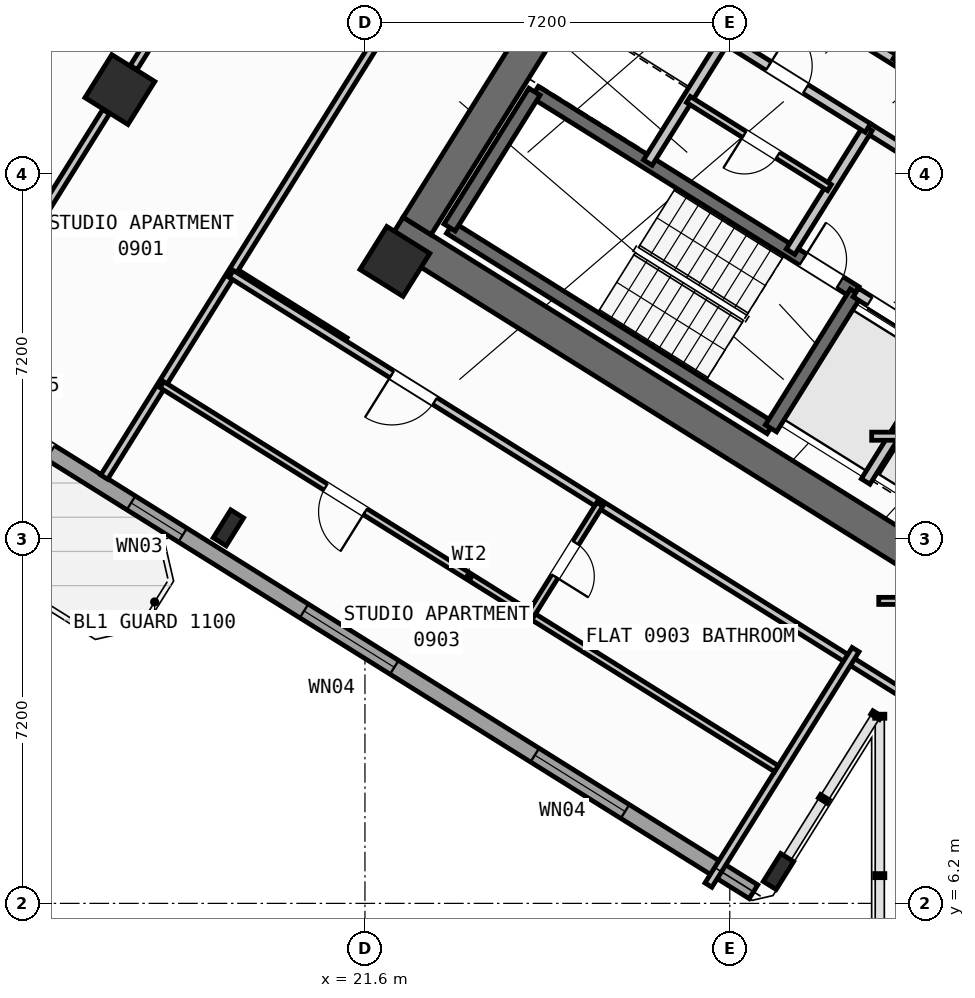
"""IFC4 building model, lengths in metres.
Left out: names, types, materials, properties, quantities, classifications, styles, units other than length and angle.
Written with IfcOpenShell. Run it as: python <this file> out.ifc"""

import sys

from ifc_helpers import new_model, si_unit, direction, frame, frame_2d, origin, origin_2d, place, context, subcontext, project, spatial, rectangle, hollow_rectangle, i_section, extrude, source, transform, mapped, element, fill, save


model = new_model("IFC4")
c1 = context("Model", 3, precision=1e-05, world=origin(), true_north=direction((0.0, 1.0)))
c2 = subcontext(c1, "Body", "Model", "MODEL_VIEW")
j1 = project(units=[si_unit("LENGTHUNIT", "METRE"), si_unit("PLANEANGLEUNIT", "RADIAN")], contexts=[c1])
p1 = place(None, origin())
s1 = spatial("IfcSite", under=j1, at=p1, CompositionType="ELEMENT")
p2 = place(p1, origin())
s2 = spatial("IfcBuilding", under=s1, at=p2, CompositionType="ELEMENT")
p3 = place(p2, frame((0.0, 0.0, 38.4)))
s3 = spatial("IfcBuildingStorey", under=s2, at=p3, CompositionType="ELEMENT", Elevation=38.4)
p4 = place(p3, frame((33.409, 12.45, 0.0), z_axis=(0.0, 0.0, 1.0), x_axis=(-0.848051132073, 0.529914405721, 0.0)))
e1 = element("IfcWall", 1, at=p4, inside=s3, PredefinedType="SHEAR", context=c2, shape_type="SweptSolid", body=[
    extrude(rectangle(XDim=13.24, YDim=0.65, at=frame_2d((6.62, 0.0))), origin(), (0.0, 0.0, 1.0), 3.35),
])
p5 = place(p3, frame((26.007, 24.976, 0.0), z_axis=(0.0, 0.0, 1.0), x_axis=(-0.529916319127, -0.848049936456, 0.0)))
e2 = element("IfcWall", 2, at=p5, inside=s3, PredefinedType="SHEAR", context=c2, shape_type="SweptSolid", body=[
    extrude(rectangle(XDim=6.375, YDim=0.65, at=frame_2d((3.188, 0.0))), origin(), (0.0, 0.0, 1.0), 3.35),
])
m1 = source(origin(), c2, "Body", "SweptSolid", [
    extrude(i_section(OverallWidth=0.3, OverallDepth=0.65, WebThickness=0.016, FlangeThickness=0.031, at=origin_2d()), origin(), (0.0, 0.0, 1.0), 3.6),
])
p6 = place(p3, frame((29.761, 6.829, 0.0), z_axis=(0.0, 0.0, 1.0), x_axis=(-0.848048096156, 0.529919264233, 0.0)))
e3 = element("IfcColumn", 3, at=p6, inside=s3, PredefinedType="COLUMN", context=c2, shape_type="MappedRepresentation", body=[
    mapped(m1, transform((0.0, 0.0, 0.0), scale=1.0)),
])
m2 = source(origin(), c2, "Body", "SweptSolid", [
    extrude(hollow_rectangle(XDim=1.0, YDim=1.0, WallThickness=0.04, at=origin_2d()), origin(), (0.0, 0.0, 1.0), 3.6),
])
p7 = place(p3, frame((22.191, 18.87, 0.0), z_axis=(0.0, 0.0, 1.0), x_axis=(-0.848048096156, 0.529919264233, 0.0)))
e4 = element("IfcColumn", 4, at=p7, inside=s3, PredefinedType="COLUMN", context=c2, shape_type="MappedRepresentation", body=[
    mapped(m2, transform((0.0, 0.0, 0.0), scale=1.0)),
])
p8 = place(p3, frame((18.906, 13.612, 0.0), z_axis=(0.0, 0.0, 1.0), x_axis=(-0.848048096156, 0.529919264233, 0.0)))
e5 = element("IfcColumn", 5, at=p8, inside=s3, PredefinedType="COLUMN", context=c2, shape_type="MappedRepresentation", body=[
    mapped(m1, transform((0.0, 0.0, 0.0), scale=1.0)),
])
p9 = place(p3, frame((16.764, 22.261, 0.0), z_axis=(0.0, 0.0, 1.0), x_axis=(-0.848048096156, 0.529919264233, 0.0)))
e6 = element("IfcColumn", 6, at=p9, inside=s3, PredefinedType="COLUMN", context=c2, shape_type="MappedRepresentation", body=[
    mapped(m2, transform((0.0, 0.0, 0.0), scale=1.0)),
])
p10 = place(p3, frame((29.268, 6.429, 0.0), z_axis=(0.0, 0.0, 1.0), x_axis=(-0.848049971435, 0.529916263149, 0.0)))
e7 = element("IfcWall", 7, at=p10, inside=s3, PredefinedType="STANDARD", context=c2, shape_type="SweptSolid", body=[
    extrude(rectangle(XDim=31.588, YDim=0.32, at=frame_2d((15.794, 0.0))), origin(), (0.0, 0.0, 1.0), 3.35),
])
p11 = place(p10, frame((16.362, 0.0, 0.0)))
e8 = element("IfcOpeningElement", 8, at=p11, cuts=e7, PredefinedType="OPENING", context=c2, shape_type="SweptSolid", body=[
    extrude(rectangle(XDim=1.2, YDim=2.15, at=frame_2d((0.6, 1.075))), frame((0.0, 0.17, 0.0), z_axis=(0.0, -1.0, 0.0), x_axis=(1.0, 0.0, 0.0)), (0.0, 0.0, 1.0), 0.34),
])
p12 = place(p10, frame((2.989, 0.0, 0.8)))
e9 = element("IfcOpeningElement", 9, at=p12, cuts=e7, PredefinedType="OPENING", context=c2, shape_type="SweptSolid", body=[
    extrude(rectangle(XDim=2.1, YDim=1.55, at=frame_2d((1.05, 0.775))), frame((0.0, 0.17, 0.0), z_axis=(0.0, -1.0, 0.0), x_axis=(1.0, 0.0, 0.0)), (0.0, 0.0, 1.0), 0.34),
])
p13 = place(p10, frame((8.359, 0.0, 0.8)))
e10 = element("IfcOpeningElement", 10, at=p13, cuts=e7, PredefinedType="OPENING", context=c2, shape_type="SweptSolid", body=[
    extrude(rectangle(XDim=2.1, YDim=1.55, at=frame_2d((1.05, 0.775))), frame((0.0, 0.17, 0.0), z_axis=(0.0, -1.0, 0.0), x_axis=(1.0, 0.0, 0.0)), (0.0, 0.0, 1.0), 0.34),
])
p14 = place(p10, frame((13.284, 0.0, 0.95)))
e11 = element("IfcOpeningElement", 11, at=p14, cuts=e7, PredefinedType="OPENING", context=c2, shape_type="SweptSolid", body=[
    extrude(rectangle(XDim=1.2, YDim=1.4, at=frame_2d((0.6, 0.7))), frame((0.0, 0.17, 0.0), z_axis=(0.0, -1.0, 0.0), x_axis=(1.0, 0.0, 0.0)), (0.0, 0.0, 1.0), 0.34),
])
p15 = place(p10, frame((20.39, 0.0, 0.95)))
e12 = element("IfcOpeningElement", 12, at=p15, cuts=e7, PredefinedType="OPENING", context=c2, shape_type="SweptSolid", body=[
    extrude(rectangle(XDim=1.2, YDim=1.4, at=frame_2d((0.6, 0.7))), frame((0.0, 0.17, 0.0), z_axis=(0.0, -1.0, 0.0), x_axis=(1.0, 0.0, 0.0)), (0.0, 0.0, 1.0), 0.34),
])
p16 = place(p10, frame((23.715, 0.0, 1.0)))
e13 = element("IfcOpeningElement", 13, at=p16, cuts=e7, PredefinedType="OPENING", context=c2, shape_type="SweptSolid", body=[
    extrude(rectangle(XDim=0.9, YDim=1.25, at=frame_2d((0.45, 0.625))), frame((0.0, 0.17, 0.0), z_axis=(0.0, -1.0, 0.0), x_axis=(1.0, 0.0, 0.0)), (0.0, 0.0, 1.0), 0.34),
])
p17 = place(p10, frame((27.481, 0.0, 0.8)))
e14 = element("IfcOpeningElement", 14, at=p17, cuts=e7, PredefinedType="OPENING", context=c2, shape_type="SweptSolid", body=[
    extrude(rectangle(XDim=2.1, YDim=1.55, at=frame_2d((1.05, 0.775))), frame((0.0, 0.17, 0.0), z_axis=(0.0, -1.0, 0.0), x_axis=(1.0, 0.0, 0.0)), (0.0, 0.0, 1.0), 0.34),
])
p18 = place(p3, frame((29.605, 15.581, 0.0), z_axis=(0.0, 0.0, 1.0), x_axis=(-0.848036911448, 0.529937163087, 0.0)))
e15 = element("IfcWall", 15, at=p18, inside=s3, PredefinedType="SHEAR", context=c2, shape_type="SweptSolid", body=[
    extrude(rectangle(XDim=7.46, YDim=0.26, at=frame_2d((3.73, 0.0))), origin(), (0.0, 0.0, 1.0), 3.35),
])
p19 = place(p3, frame((31.28, 18.261, 0.0), z_axis=(0.0, 0.0, 1.0), x_axis=(-0.848051618787, 0.529913626805, 0.0)))
e16 = element("IfcWall", 16, at=p19, inside=s3, PredefinedType="SHEAR", context=c2, shape_type="SweptSolid", body=[
    extrude(rectangle(XDim=7.46, YDim=0.26, at=frame_2d((3.73, 0.0))), origin(), (0.0, 0.0, 1.0), 3.35),
])
p20 = place(p19, frame((0.36, 0.0, 0.0)))
e17 = element("IfcOpeningElement", 17, at=p20, cuts=e16, PredefinedType="OPENING", context=c2, shape_type="SweptSolid", body=[
    extrude(rectangle(XDim=0.86, YDim=2.05, at=frame_2d((0.43, 1.025))), frame((0.0, 0.14, 0.0), z_axis=(0.0, -1.0, 0.0), x_axis=(1.0, 0.0, 0.0)), (0.0, 0.0, 1.0), 0.28),
])
p21 = place(p3, frame((31.288, 18.256, 0.0), z_axis=(0.0, 0.0, 1.0), x_axis=(-0.529943379326, -0.848033026897, 0.0)))
e18 = element("IfcWall", 18, at=p21, inside=s3, PredefinedType="SHEAR", context=c2, shape_type="SweptSolid", body=[
    extrude(rectangle(XDim=3.16, YDim=0.26, at=frame_2d((1.58, 0.0))), origin(), (0.0, 0.0, 1.0), 3.35),
])
p22 = place(p3, frame((24.945, 22.22, 0.0), z_axis=(0.0, 0.0, 1.0), x_axis=(-0.529908658664, -0.84805472316, 0.0)))
e19 = element("IfcWall", 19, at=p22, inside=s3, PredefinedType="SHEAR", context=c2, shape_type="SweptSolid", body=[
    extrude(rectangle(XDim=3.16, YDim=0.26, at=frame_2d((1.58, 0.0))), origin(), (0.0, 0.0, 1.0), 3.35),
])
p23 = place(p3, frame((38.046, 21.108, 0.0), z_axis=(0.0, 0.0, 1.0), x_axis=(-0.848054434086, 0.529909121291, 0.0)))
e20 = element("IfcWall", 20, at=p23, inside=s3, PredefinedType="SHEAR", context=c2, shape_type="SweptSolid", body=[
    extrude(rectangle(XDim=7.33, YDim=0.26, at=frame_2d((3.665, 0.0))), origin(), (0.0, 0.0, 1.0), 3.35),
])
p24 = place(p23, frame((0.22, 0.0, 0.0)))
e21 = element("IfcOpeningElement", 21, at=p24, cuts=e20, PredefinedType="OPENING", context=c2, shape_type="SweptSolid", body=[
    extrude(rectangle(XDim=1.1, YDim=2.1, at=frame_2d((0.55, 1.05))), frame((0.0, 0.14, 0.0), z_axis=(0.0, -1.0, 0.0), x_axis=(1.0, 0.0, 0.0)), (0.0, 0.0, 1.0), 0.28),
])
p25 = place(p3, frame((34.848, 16.031, 0.0), z_axis=(0.0, 0.0, 1.0), x_axis=(-0.848044042236, 0.529925751807, 0.0)))
e22 = element("IfcWall", 22, at=p25, inside=s3, PredefinedType="STANDARD", context=c2, shape_type="SweptSolid", body=[
    extrude(rectangle(XDim=4.198, YDim=0.2, at=frame_2d((2.099, 0.0))), origin(), (0.0, 0.0, 1.0), 3.34),
])
p26 = place(p25, frame((0.348, 0.0, 0.0)))
e23 = element("IfcOpeningElement", 23, at=p26, cuts=e22, PredefinedType="OPENING", context=c2, shape_type="SweptSolid", body=[
    extrude(rectangle(XDim=1.3, YDim=2.2, at=frame_2d((0.65, 1.1))), frame((0.0, 0.11, 0.0), z_axis=(0.0, -1.0, 0.0), x_axis=(1.0, 0.0, 0.0)), (0.0, 0.0, 1.0), 0.22),
])
p27 = place(p25, frame((2.423, 0.0, 0.0)))
e24 = element("IfcOpeningElement", 24, at=p27, cuts=e22, PredefinedType="OPENING", context=c2, shape_type="SweptSolid", body=[
    extrude(rectangle(XDim=1.45, YDim=2.25, at=frame_2d((0.725, 1.125))), frame((0.0, 0.11, 0.0), z_axis=(0.0, -1.0, 0.0), x_axis=(1.0, 0.0, 0.0)), (0.0, 0.0, 1.0), 0.22),
])
p28 = place(p3, frame((36.374, 18.474, 0.0), z_axis=(0.0, 0.0, 1.0), x_axis=(-0.848051071577, 0.529914502535, 0.0)))
e25 = element("IfcWall", 25, at=p28, inside=s3, PredefinedType="STANDARD", context=c2, shape_type="SweptSolid", body=[
    extrude(rectangle(XDim=5.718, YDim=0.2, at=frame_2d((2.859, 0.0))), origin(), (0.0, 0.0, 1.0), 3.34),
])
p29 = place(p28, frame((2.498, 0.0, 0.0)))
e26 = element("IfcOpeningElement", 26, at=p29, cuts=e25, PredefinedType="OPENING", context=c2, shape_type="SweptSolid", body=[
    extrude(rectangle(XDim=1.15, YDim=2.1, at=frame_2d((0.575, 1.05))), frame((0.0, 0.11, 0.0), z_axis=(0.0, -1.0, 0.0), x_axis=(1.0, 0.0, 0.0)), (0.0, 0.0, 1.0), 0.22),
])
p30 = place(p3, frame((32.108, 22.814, 0.0), z_axis=(0.0, 0.0, 1.0), x_axis=(-0.848042229521, 0.529928652696, 0.0)))
e27 = element("IfcWall", 27, at=p30, inside=s3, PredefinedType="STANDARD", context=c2, shape_type="SweptSolid", body=[
    extrude(rectangle(XDim=5.62, YDim=0.2, at=frame_2d((2.81, 0.0))), origin(), (0.0, 0.0, 1.0), 3.34),
])
p31 = place(p3, frame((32.982, 24.213, 0.0), z_axis=(0.0, 0.0, 1.0), x_axis=(-0.529839334948, -0.84809803628, 0.0)))
e28 = element("IfcWall", 28, at=p31, inside=s3, PredefinedType="STANDARD", context=c2, shape_type="SweptSolid", body=[
    extrude(rectangle(XDim=1.65, YDim=0.2, at=frame_2d((0.825, 0.0))), origin(), (0.0, 0.0, 1.0), 3.34),
])
p32 = place(p3, frame((33.029, 17.003, 0.0), z_axis=(0.0, 0.0, 1.0), x_axis=(-0.529916267533, -0.848049968695, 0.0)))
e29 = element("IfcWall", 29, at=p32, inside=s3, PredefinedType="STANDARD", context=c2, shape_type="SweptSolid", body=[
    extrude(rectangle(XDim=2.92, YDim=0.2, at=frame_2d((1.46, 0.0))), origin(), (0.0, 0.0, 1.0), 3.34),
])
for number, where, z_axis, x_axis in (
    (30, (31.525, 21.504, 0.0), (0.0, 0.0, 1.0), (-0.53, -0.848, 0.0)),
    (31, (28.71, 23.263, 0.0), (0.0, 0.0, 1.0), (-0.53, -0.848, 0.0)),
):
    element("IfcWall", number, at=place(p3, frame(where, z_axis=z_axis, x_axis=x_axis)), inside=s3, PredefinedType="STANDARD", context=c2, shape_type="SweptSolid", body=[
        extrude(rectangle(XDim=2.88, YDim=0.2, at=frame_2d((1.44, 0.0))), origin(), (0.0, 0.0, 1.0), 3.34),
    ])
p33 = place(p3, frame((31.525, 21.504, 0.0), z_axis=(0.0, 0.0, 1.0), x_axis=(-0.848044998614, 0.529924221305, 0.0)))
e32 = element("IfcWall", 32, at=p33, inside=s3, PredefinedType="STANDARD", context=c2, shape_type="SweptSolid", body=[
    extrude(rectangle(XDim=6.168, YDim=0.2, at=frame_2d((3.084, 0.0))), origin(), (0.0, 0.0, 1.0), 3.34),
])
p34 = place(p33, frame((4.4, 0.0, 0.0)))
e33 = element("IfcOpeningElement", 33, at=p34, cuts=e32, PredefinedType="OPENING", context=c2, shape_type="SweptSolid", body=[
    extrude(rectangle(XDim=0.86, YDim=2.05, at=frame_2d((0.43, 1.025))), frame((0.0, 0.11, 0.0), z_axis=(0.0, -1.0, 0.0), x_axis=(1.0, 0.0, 0.0)), (0.0, 0.0, 1.0), 0.22),
])
p35 = place(p33, frame((1.45, 0.0, 0.0)))
e34 = element("IfcOpeningElement", 34, at=p35, cuts=e32, PredefinedType="OPENING", context=c2, shape_type="SweptSolid", body=[
    extrude(rectangle(XDim=0.86, YDim=2.05, at=frame_2d((0.43, 1.025))), frame((0.0, 0.11, 0.0), z_axis=(0.0, -1.0, 0.0), x_axis=(1.0, 0.0, 0.0)), (0.0, 0.0, 1.0), 0.22),
])
p36 = place(p3, frame((30.766, 20.327, 0.0), z_axis=(0.0, 0.0, 1.0), x_axis=(-0.848052663127, 0.529911955482, 0.0)))
e35 = element("IfcWall", 35, at=p36, inside=s3, PredefinedType="PLUMBINGWALL", context=c2, shape_type="SweptSolid", body=[
    extrude(rectangle(XDim=3.28, YDim=0.14, at=frame_2d((1.64, 0.0))), origin(), (0.0, 0.0, 1.0), 3.34),
])
p37 = place(p36, frame((1.2, 0.0, 0.0)))
e36 = element("IfcOpeningElement", 36, at=p37, cuts=e35, PredefinedType="OPENING", context=c2, shape_type="SweptSolid", body=[
    extrude(rectangle(XDim=0.78, YDim=2.05, at=frame_2d((0.39, 1.025))), frame((0.0, 0.08, 0.0), z_axis=(0.0, -1.0, 0.0), x_axis=(1.0, 0.0, 0.0)), (0.0, 0.0, 1.0), 0.16),
])
p38 = place(p3, frame((21.206, 17.292, 0.0), z_axis=(0.0, 0.0, 1.0), x_axis=(-0.848050851465, 0.529914854792, 0.0)))
e37 = element("IfcWall", 37, at=p38, inside=s3, PredefinedType="PARTITIONING", context=c2, shape_type="SweptSolid", body=[
    extrude(rectangle(XDim=2.61, YDim=0.16, at=frame_2d((1.305, 0.0))), origin(), (0.0, 0.0, 1.0), 3.34),
])
p39 = place(p3, frame((25.807, 29.582, 0.0), z_axis=(0.0, 0.0, 1.0), x_axis=(-0.529918119251, -0.84804881162, 0.0)))
e38 = element("IfcWall", 38, at=p39, inside=s3, PredefinedType="PARTITIONING", context=c2, shape_type="SweptSolid", body=[
    extrude(rectangle(XDim=17.65, YDim=0.16, at=frame_2d((8.825, 0.0))), origin(), (0.0, 0.0, 1.0), 3.34),
])
p40 = place(p3, frame((20.361, 28.018, 0.0), z_axis=(0.0, 0.0, 1.0), x_axis=(-0.529915015264, -0.848050751193, 0.0)))
e39 = element("IfcWall", 39, at=p40, inside=s3, PredefinedType="PARTITIONING", context=c2, shape_type="SweptSolid", body=[
    extrude(rectangle(XDim=6.276, YDim=0.16, at=frame_2d((3.138, 0.0))), origin(), (0.0, 0.0, 1.0), 2.725),
])
p41 = place(p3, frame((16.492, 21.827, 0.0), z_axis=(0.0, 0.0, 1.0), x_axis=(-0.529904608059, -0.848057254175, 0.0)))
e40 = element("IfcWall", 40, at=p41, inside=s3, PredefinedType="PARTITIONING", context=c2, shape_type="SweptSolid", body=[
    extrude(rectangle(XDim=5.351, YDim=0.16, at=frame_2d((2.675, 0.0))), origin(), (0.0, 0.0, 1.0), 2.725),
])
p42 = place(p3, frame((17.861, 31.505, 0.0), z_axis=(0.0, 0.0, 1.0), x_axis=(-0.529928839727, -0.848042112649, 0.0)))
e41 = element("IfcWall", 41, at=p42, inside=s3, PredefinedType="PARTITIONING", context=c2, shape_type="SweptSolid", body=[
    extrude(rectangle(XDim=15.34, YDim=0.11, at=frame_2d((7.67, 0.0))), origin(), (0.0, 0.0, 1.0), 3.34),
])
p43 = place(p42, frame((0.35, 0.0, 0.0)))
e42 = element("IfcOpeningElement", 42, at=p43, cuts=e41, PredefinedType="OPENING", context=c2, shape_type="SweptSolid", body=[
    extrude(rectangle(XDim=0.92, YDim=2.08, at=frame_2d((0.46, 1.04))), frame((0.0, 0.065, 0.0), z_axis=(0.0, -1.0, 0.0), x_axis=(1.0, 0.0, 0.0)), (0.0, 0.0, 1.0), 0.13),
])
p44 = place(p3, frame((32.164, 10.374, 0.0), z_axis=(0.0, 0.0, 1.0), x_axis=(-0.848044107957, 0.529925646633, 0.0)))
e43 = element("IfcWall", 43, at=p44, inside=s3, PredefinedType="PARTITIONING", context=c2, shape_type="SweptSolid", body=[
    extrude(rectangle(XDim=15.57, YDim=0.16, at=frame_2d((7.785, 0.0))), origin(), (0.0, 0.0, 1.0), 3.34),
])
p45 = place(p44, frame((10.83, 0.0, 0.0)))
e44 = element("IfcOpeningElement", 44, at=p45, cuts=e43, PredefinedType="OPENING", context=c2, shape_type="SweptSolid", body=[
    extrude(rectangle(XDim=1.0, YDim=2.1, at=frame_2d((0.5, 1.05))), frame((0.0, 0.09, 0.0), z_axis=(0.0, -1.0, 0.0), x_axis=(1.0, 0.0, 0.0)), (0.0, 0.0, 1.0), 0.18),
])
p46 = place(p3, frame((31.282, 11.208, 0.0), z_axis=(0.0, 0.0, 1.0), x_axis=(-0.529938869374, -0.84803584519, 0.0)))
e45 = element("IfcWall", 45, at=p46, inside=s3, PredefinedType="PARTITIONING", context=c2, shape_type="SweptSolid", body=[
    extrude(rectangle(XDim=5.48, YDim=0.16, at=frame_2d((2.74, 0.0))), origin(), (0.0, 0.0, 1.0), 3.34),
])
p47 = place(p3, frame((29.72, 8.859, 0.0), z_axis=(0.0, 0.0, 1.0), x_axis=(-0.848049134363, 0.529917602752, 0.0)))
e46 = element("IfcWall", 46, at=p47, inside=s3, PredefinedType="PLUMBINGWALL", context=c2, shape_type="SweptSolid", body=[
    extrude(rectangle(XDim=14.3, YDim=0.14, at=frame_2d((7.15, 0.0))), origin(), (0.0, 0.0, 1.0), 3.34),
])
p48 = place(p47, frame((9.57, 0.0, 0.0)))
e47 = element("IfcOpeningElement", 47, at=p48, cuts=e46, PredefinedType="OPENING", context=c2, shape_type="SweptSolid", body=[
    extrude(rectangle(XDim=0.92, YDim=2.08, at=frame_2d((0.46, 1.04))), frame((0.0, 0.08, 0.0), z_axis=(0.0, -1.0, 0.0), x_axis=(1.0, 0.0, 0.0)), (0.0, 0.0, 1.0), 0.16),
])
p49 = place(p3, frame((26.237, 14.078, 0.0), z_axis=(0.0, 0.0, 1.0), x_axis=(-0.52995640672, -0.848024885824, 0.0)))
e48 = element("IfcWall", 48, at=p49, inside=s3, PredefinedType="PLUMBINGWALL", context=c2, shape_type="SweptSolid", body=[
    extrude(rectangle(XDim=2.58, YDim=0.14, at=frame_2d((1.29, 0.0))), origin(), (0.0, 0.0, 1.0), 3.34),
])
p50 = place(p49, frame((0.9, 0.0, 0.0)))
e49 = element("IfcOpeningElement", 49, at=p50, cuts=e48, PredefinedType="OPENING", context=c2, shape_type="SweptSolid", body=[
    extrude(rectangle(XDim=0.78, YDim=2.05, at=frame_2d((0.39, 1.025))), frame((0.0, 0.08, 0.0), z_axis=(0.0, -1.0, 0.0), x_axis=(1.0, 0.0, 0.0)), (0.0, 0.0, 1.0), 0.16),
])
p51 = place(p3, frame((31.6, 15.42, 0.0), z_axis=(0.0, 0.0, 1.0), x_axis=(1.0, 0.0, 0.0)))
e50 = element("IfcWall", 50, at=p51, inside=s3, PredefinedType="PARTITIONING", context=c2, shape_type="SweptSolid", body=[
    extrude(rectangle(XDim=2.866, YDim=0.16, at=frame_2d((1.433, 0.0))), origin(), (0.0, 0.0, 1.0), 3.34),
])
p52 = place(p3, frame((31.74, 12.17, 0.0), z_axis=(0.0, 0.0, 1.0), x_axis=(1.0, 0.0, 0.0)))
e51 = element("IfcWall", 51, at=p52, inside=s3, PredefinedType="PLUMBINGWALL", context=c2, shape_type="SweptSolid", body=[
    extrude(rectangle(XDim=0.754, YDim=0.14, at=frame_2d((0.377, 0.0))), origin(), (0.0, 0.0, 1.0), 3.34),
])
m3 = source(origin(), c2, "Body", "SweptSolid", [
    extrude(rectangle(XDim=2.1, YDim=1.55, at=frame_2d((1.05, 0.775))), frame((0.0, 0.03, 0.0), z_axis=(0.0, -1.0, 0.0), x_axis=(1.0, 0.0, 0.0)), (0.0, 0.0, 1.0), 0.06),
])
p53 = place(p12, origin())
e52 = element("IfcWindow", 52, at=p53, inside=s3, PartitioningType="SINGLE_PANEL", PredefinedType="WINDOW", context=c2, shape_type="MappedRepresentation", body=[
    mapped(m3, transform((0.0, 0.0, 0.0), scale=1.0)),
])
fill(e9, e52)
p54 = place(p13, origin())
e53 = element("IfcWindow", 53, at=p54, inside=s3, PartitioningType="SINGLE_PANEL", PredefinedType="WINDOW", context=c2, shape_type="MappedRepresentation", body=[
    mapped(m3, transform((0.0, 0.0, 0.0), scale=1.0)),
])
fill(e10, e53)
m4 = source(origin(), c2, "Body", "SweptSolid", [
    extrude(rectangle(XDim=1.2, YDim=1.4, at=frame_2d((0.6, 0.7))), frame((0.0, 0.03, 0.0), z_axis=(0.0, -1.0, 0.0), x_axis=(1.0, 0.0, 0.0)), (0.0, 0.0, 1.0), 0.06),
])
p55 = place(p14, origin())
e54 = element("IfcWindow", 54, at=p55, inside=s3, PartitioningType="SINGLE_PANEL", PredefinedType="WINDOW", context=c2, shape_type="MappedRepresentation", body=[
    mapped(m4, transform((0.0, 0.0, 0.0), scale=1.0)),
])
fill(e11, e54)
m5 = source(origin(), c2, "Body", "SweptSolid", [
    extrude(rectangle(XDim=0.86, YDim=2.05, at=frame_2d((0.43, 1.025))), frame((0.0, 0.025, 0.0), z_axis=(0.0, -1.0, 0.0), x_axis=(1.0, 0.0, 0.0)), (0.0, 0.0, 1.0), 0.05),
])
p56 = place(p20, frame((0.86, 0.0, 0.0), z_axis=(0.0, 0.0, 1.0), x_axis=(-1.0, 0.0, 0.0)))
e55 = element("IfcDoor", 55, at=p56, inside=s3, OperationType="SINGLE_SWING_LEFT", PredefinedType="DOOR", context=c2, shape_type="MappedRepresentation", body=[
    mapped(m5, transform((0.0, 0.0, 0.0), scale=1.0)),
])
fill(e17, e55)
m6 = source(origin(), c2, "Body", "SweptSolid", [
    extrude(rectangle(XDim=1.45, YDim=2.25, at=frame_2d((0.725, 1.125))), frame((0.0, 0.025, 0.0), z_axis=(0.0, -1.0, 0.0), x_axis=(1.0, 0.0, 0.0)), (0.0, 0.0, 1.0), 0.05),
])
p57 = place(p27, origin())
e56 = element("IfcDoor", 56, at=p57, inside=s3, OperationType="DOUBLE_DOOR_SLIDING", PredefinedType="DOOR", context=c2, shape_type="MappedRepresentation", body=[
    mapped(m6, transform((0.0, 0.0, 0.0), scale=1.0)),
])
fill(e24, e56)
p58 = place(p35, frame((0.86, 0.0, 0.0), z_axis=(0.0, 0.0, 1.0), x_axis=(-1.0, 0.0, 0.0)))
e57 = element("IfcDoor", 57, at=p58, inside=s3, OperationType="SINGLE_SWING_LEFT", PredefinedType="DOOR", context=c2, shape_type="MappedRepresentation", body=[
    mapped(m5, transform((0.0, 0.0, 0.0), scale=1.0)),
])
fill(e34, e57)
m7 = source(origin(), c2, "Body", "SweptSolid", [
    extrude(rectangle(XDim=0.78, YDim=2.05, at=frame_2d((0.39, 1.025))), frame((0.0, 0.025, 0.0), z_axis=(0.0, -1.0, 0.0), x_axis=(1.0, 0.0, 0.0)), (0.0, 0.0, 1.0), 0.05),
])
p59 = place(p37, origin())
e58 = element("IfcDoor", 58, at=p59, inside=s3, OperationType="SINGLE_SWING_RIGHT", PredefinedType="DOOR", context=c2, shape_type="MappedRepresentation", body=[
    mapped(m7, transform((0.0, 0.0, 0.0), scale=1.0)),
])
fill(e36, e58)
m8 = source(origin(), c2, "Body", "SweptSolid", [
    extrude(rectangle(XDim=1.0, YDim=2.1, at=frame_2d((0.5, 1.05))), frame((0.0, 0.025, 0.0), z_axis=(0.0, -1.0, 0.0), x_axis=(1.0, 0.0, 0.0)), (0.0, 0.0, 1.0), 0.05),
])
p60 = place(p45, origin())
e59 = element("IfcDoor", 59, at=p60, inside=s3, OperationType="SINGLE_SWING_RIGHT", PredefinedType="DOOR", context=c2, shape_type="MappedRepresentation", body=[
    mapped(m8, transform((0.0, 0.0, 0.0), scale=1.0)),
])
fill(e44, e59)
m9 = source(origin(), c2, "Body", "SweptSolid", [
    extrude(rectangle(XDim=0.92, YDim=2.08, at=frame_2d((0.46, 1.04))), frame((0.0, 0.025, 0.0), z_axis=(0.0, -1.0, 0.0), x_axis=(1.0, 0.0, 0.0)), (0.0, 0.0, 1.0), 0.05),
])
p61 = place(p48, origin())
e60 = element("IfcDoor", 60, at=p61, inside=s3, OperationType="SINGLE_SWING_LEFT", PredefinedType="DOOR", context=c2, shape_type="MappedRepresentation", body=[
    mapped(m9, transform((0.0, 0.0, 0.0), scale=1.0)),
])
fill(e47, e60)
p62 = place(p50, origin())
e61 = element("IfcDoor", 61, at=p62, inside=s3, OperationType="SINGLE_SWING_RIGHT", PredefinedType="DOOR", context=c2, shape_type="MappedRepresentation", body=[
    mapped(m7, transform((0.0, 0.0, 0.0), scale=1.0)),
])
fill(e49, e61)
save(model, sys.argv[1])
